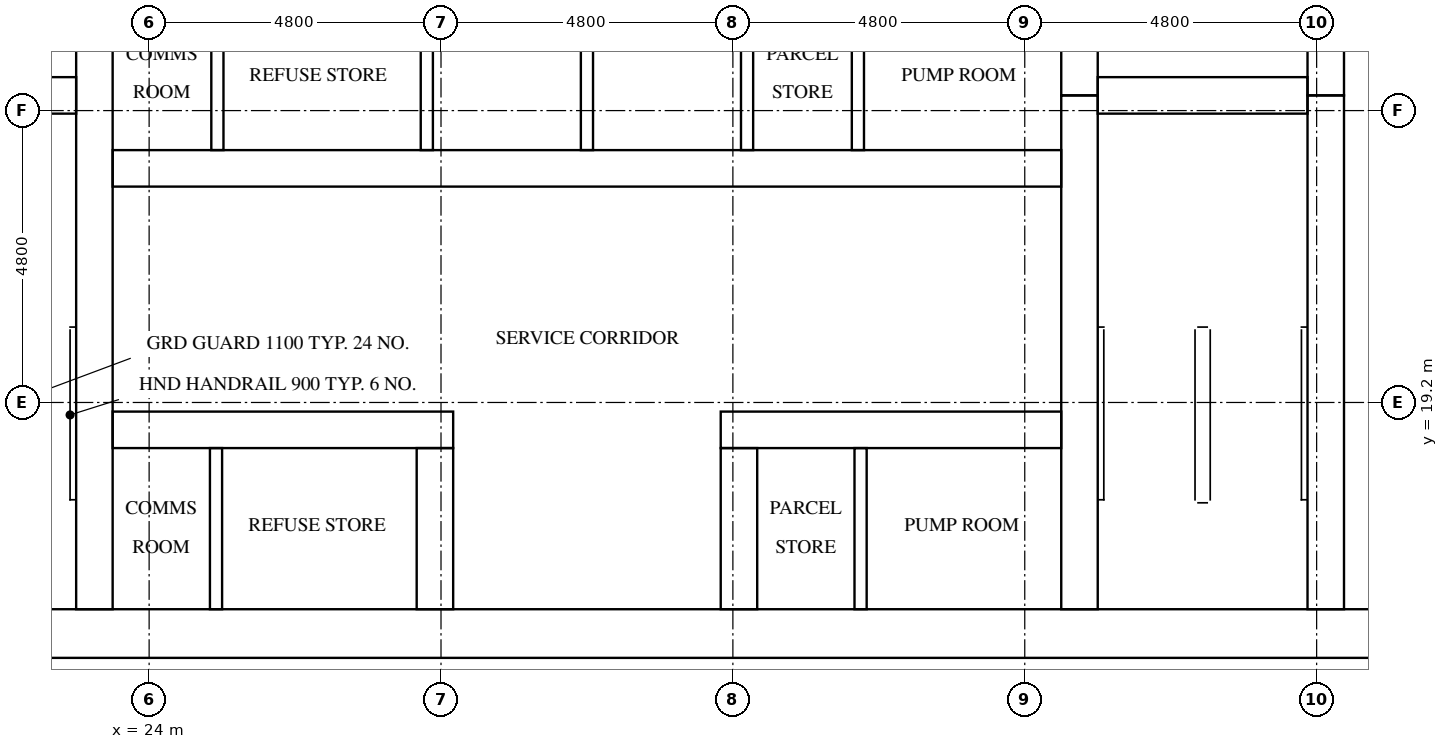
"""IFC4 building model, lengths in metres.
Left out: names, types, materials, properties, quantities, classifications, styles, units other than length and angle.
Written with IfcOpenShell. Run it as: python <this file> out.ifc"""

import sys

from ifc_helpers import new_model, si_unit, direction, frame, frame_2d, origin, place, context, subcontext, project, spatial, rectangle, extrude, element, fill, save


model = new_model("IFC4")
c1 = context("Model", 3, precision=1e-05, world=origin(), true_north=direction((0.0, 1.0)))
c2 = subcontext(c1, "Body", "Model", "MODEL_VIEW")
j1 = project(units=[si_unit("LENGTHUNIT", "METRE"), si_unit("PLANEANGLEUNIT", "RADIAN")], contexts=[c1])
p1 = place(None, origin())
s1 = spatial("IfcSite", under=j1, at=p1, CompositionType="ELEMENT")
p2 = place(p1, origin())
s2 = spatial("IfcBuilding", under=s1, at=p2, CompositionType="ELEMENT")
p3 = place(p2, frame((0.0, 0.0, 166.5)))
s3 = spatial("IfcBuildingStorey", under=s2, at=p3, CompositionType="ELEMENT", Elevation=166.5)
p4 = place(p3, frame((15.0, 15.4, 0.0), z_axis=(0.0, 0.0, 1.0), x_axis=(1.0, 0.0, 0.0)))
e1 = element("IfcWall", 1, at=p4, inside=s3, PredefinedType="SHEAR", context=c2, shape_type="SweptSolid", body=[
    extrude(rectangle(XDim=32.4, YDim=0.8, at=frame_2d((16.2, 0.0))), origin(), (0.0, 0.0, 1.0), 3.2),
])
p5 = place(p4, frame((15.3, 0.0, 0.0)))
e2 = element("IfcOpeningElement", 2, at=p5, cuts=e1, PredefinedType="OPENING", context=c2, shape_type="SweptSolid", body=[
    extrude(rectangle(XDim=1.8, YDim=2.1, at=frame_2d((0.9, 1.05))), frame((0.0, 0.41, 0.0), z_axis=(0.0, -1.0, 0.0), x_axis=(1.0, 0.0, 0.0)), (0.0, 0.0, 1.0), 0.82),
])
p6 = place(p3, frame((23.1, 15.8, 0.0), z_axis=(0.0, 0.0, 1.0), x_axis=(0.0, 1.0, 0.0)))
e3 = element("IfcWall", 3, at=p6, inside=s3, PredefinedType="SHEAR", context=c2, shape_type="SweptSolid", body=[
    extrude(rectangle(XDim=21.2, YDim=0.6, at=frame_2d((10.6, 0.0))), origin(), (0.0, 0.0, 1.0), 3.2),
])
p7 = place(p3, frame((39.3, 15.8, 0.0), z_axis=(0.0, 0.0, 1.0), x_axis=(0.0, 1.0, 0.0)))
e4 = element("IfcWall", 4, at=p7, inside=s3, PredefinedType="SHEAR", context=c2, shape_type="SweptSolid", body=[
    extrude(rectangle(XDim=8.45, YDim=0.6, at=frame_2d((4.225, 0.0))), origin(), (0.0, 0.0, 1.0), 3.2),
])
p8 = place(p3, frame((39.3, 24.25, 0.0), z_axis=(0.0, 0.0, 1.0), x_axis=(0.0, 1.0, 0.0)))
e5 = element("IfcWall", 5, at=p8, inside=s3, PredefinedType="SHEAR", context=c2, shape_type="SweptSolid", body=[
    extrude(rectangle(XDim=3.5, YDim=0.6, at=frame_2d((1.75, 0.0))), origin(), (0.0, 0.0, 1.0), 3.2),
])
p9 = place(p3, frame((43.35, 15.8, 0.0), z_axis=(0.0, 0.0, 1.0), x_axis=(0.0, 1.0, 0.0)))
e6 = element("IfcWall", 6, at=p9, inside=s3, PredefinedType="SHEAR", context=c2, shape_type="SweptSolid", body=[
    extrude(rectangle(XDim=8.45, YDim=0.6, at=frame_2d((4.225, 0.0))), origin(), (0.0, 0.0, 1.0), 3.2),
])
p10 = place(p9, frame((0.4, 0.0, 0.0)))
e7 = element("IfcOpeningElement", 7, at=p10, cuts=e6, PredefinedType="OPENING", context=c2, shape_type="SweptSolid", body=[
    extrude(rectangle(XDim=1.2, YDim=2.1, at=frame_2d((0.6, 1.05))), frame((0.0, 0.31, 0.0), z_axis=(0.0, -1.0, 0.0), x_axis=(1.0, 0.0, 0.0)), (0.0, 0.0, 1.0), 0.62),
])
p11 = place(p3, frame((43.35, 24.25, 0.0), z_axis=(0.0, 0.0, 1.0), x_axis=(0.0, 1.0, 0.0)))
e8 = element("IfcWall", 8, at=p11, inside=s3, PredefinedType="SHEAR", context=c2, shape_type="SweptSolid", body=[
    extrude(rectangle(XDim=3.5, YDim=0.6, at=frame_2d((1.75, 0.0))), origin(), (0.0, 0.0, 1.0), 3.2),
])
p12 = place(p11, frame((1.2, 0.0, 0.0)))
e9 = element("IfcOpeningElement", 9, at=p12, cuts=e8, PredefinedType="OPENING", context=c2, shape_type="SweptSolid", body=[
    extrude(rectangle(XDim=1.1, YDim=2.1, at=frame_2d((0.55, 1.05))), frame((0.0, 0.31, 0.0), z_axis=(0.0, -1.0, 0.0), x_axis=(1.0, 0.0, 0.0)), (0.0, 0.0, 1.0), 0.62),
])
for number, where, z_axis, x_axis in (
    (10, (19.35, 24.25, 0.0), (0.0, 0.0, 1.0), (1.0, 0.0, 0.0)),
    (11, (39.6, 24.25, 0.0), (0.0, 0.0, 1.0), (1.0, 0.0, 0.0)),
):
    element("IfcWall", number, at=place(p3, frame(where, z_axis=z_axis, x_axis=x_axis)), inside=s3, PredefinedType="SHEAR", context=c2, shape_type="SweptSolid", body=[
        extrude(rectangle(XDim=3.45, YDim=0.6, at=frame_2d((1.725, 0.0))), origin(), (0.0, 0.0, 1.0), 3.2),
    ])
p13 = place(p3, frame((23.4, 18.75, 0.0), z_axis=(0.0, 0.0, 1.0), x_axis=(1.0, 0.0, 0.0)))
e12 = element("IfcWall", 12, at=p13, inside=s3, PredefinedType="SHEAR", context=c2, shape_type="SweptSolid", body=[
    extrude(rectangle(XDim=5.6, YDim=0.6, at=frame_2d((2.8, 0.0))), origin(), (0.0, 0.0, 1.0), 3.2),
])
p14 = place(p13, frame((0.3, 0.0, 0.0)))
e13 = element("IfcOpeningElement", 13, at=p14, cuts=e12, PredefinedType="OPENING", context=c2, shape_type="SweptSolid", body=[
    extrude(rectangle(XDim=1.0, YDim=2.1, at=frame_2d((0.5, 1.05))), frame((0.0, 0.31, 0.0), z_axis=(0.0, -1.0, 0.0), x_axis=(1.0, 0.0, 0.0)), (0.0, 0.0, 1.0), 0.62),
])
p15 = place(p13, frame((2.9, 0.0, 0.0)))
e14 = element("IfcOpeningElement", 14, at=p15, cuts=e12, PredefinedType="OPENING", context=c2, shape_type="SweptSolid", body=[
    extrude(rectangle(XDim=1.0, YDim=2.1, at=frame_2d((0.5, 1.05))), frame((0.0, 0.31, 0.0), z_axis=(0.0, -1.0, 0.0), x_axis=(1.0, 0.0, 0.0)), (0.0, 0.0, 1.0), 0.62),
])
p16 = place(p3, frame((33.4, 18.75, 0.0), z_axis=(0.0, 0.0, 1.0), x_axis=(1.0, 0.0, 0.0)))
e15 = element("IfcWall", 15, at=p16, inside=s3, PredefinedType="SHEAR", context=c2, shape_type="SweptSolid", body=[
    extrude(rectangle(XDim=5.6, YDim=0.6, at=frame_2d((2.8, 0.0))), origin(), (0.0, 0.0, 1.0), 3.2),
])
p17 = place(p16, frame((0.9, 0.0, 0.0)))
e16 = element("IfcOpeningElement", 16, at=p17, cuts=e15, PredefinedType="OPENING", context=c2, shape_type="SweptSolid", body=[
    extrude(rectangle(XDim=1.0, YDim=2.1, at=frame_2d((0.5, 1.05))), frame((0.0, 0.31, 0.0), z_axis=(0.0, -1.0, 0.0), x_axis=(1.0, 0.0, 0.0)), (0.0, 0.0, 1.0), 0.62),
])
p18 = place(p16, frame((3.5, 0.0, 0.0)))
e17 = element("IfcOpeningElement", 17, at=p18, cuts=e15, PredefinedType="OPENING", context=c2, shape_type="SweptSolid", body=[
    extrude(rectangle(XDim=1.0, YDim=2.1, at=frame_2d((0.5, 1.05))), frame((0.0, 0.31, 0.0), z_axis=(0.0, -1.0, 0.0), x_axis=(1.0, 0.0, 0.0)), (0.0, 0.0, 1.0), 0.62),
])
p19 = place(p3, frame((23.4, 23.05, 0.0), z_axis=(0.0, 0.0, 1.0), x_axis=(1.0, 0.0, 0.0)))
e18 = element("IfcWall", 18, at=p19, inside=s3, PredefinedType="SHEAR", context=c2, shape_type="SweptSolid", body=[
    extrude(rectangle(XDim=15.6, YDim=0.6, at=frame_2d((7.8, 0.0))), origin(), (0.0, 0.0, 1.0), 3.2),
])
p20 = place(p19, frame((0.311, 0.0, 0.0)))
e19 = element("IfcOpeningElement", 19, at=p20, cuts=e18, PredefinedType="OPENING", context=c2, shape_type="SweptSolid", body=[
    extrude(rectangle(XDim=1.0, YDim=2.1, at=frame_2d((0.5, 1.05))), frame((0.0, 0.31, 0.0), z_axis=(0.0, -1.0, 0.0), x_axis=(1.0, 0.0, 0.0)), (0.0, 0.0, 1.0), 0.62),
])
p21 = place(p19, frame((2.945, 0.0, 0.0)))
e20 = element("IfcOpeningElement", 20, at=p21, cuts=e18, PredefinedType="OPENING", context=c2, shape_type="SweptSolid", body=[
    extrude(rectangle(XDim=1.0, YDim=2.1, at=frame_2d((0.5, 1.05))), frame((0.0, 0.31, 0.0), z_axis=(0.0, -1.0, 0.0), x_axis=(1.0, 0.0, 0.0)), (0.0, 0.0, 1.0), 0.62),
])
p22 = place(p19, frame((10.845, 0.0, 0.0)))
e21 = element("IfcOpeningElement", 21, at=p22, cuts=e18, PredefinedType="OPENING", context=c2, shape_type="SweptSolid", body=[
    extrude(rectangle(XDim=1.0, YDim=2.1, at=frame_2d((0.5, 1.05))), frame((0.0, 0.31, 0.0), z_axis=(0.0, -1.0, 0.0), x_axis=(1.0, 0.0, 0.0)), (0.0, 0.0, 1.0), 0.62),
])
p23 = place(p19, frame((13.478, 0.0, 0.0)))
e22 = element("IfcOpeningElement", 22, at=p23, cuts=e18, PredefinedType="OPENING", context=c2, shape_type="SweptSolid", body=[
    extrude(rectangle(XDim=1.0, YDim=2.1, at=frame_2d((0.5, 1.05))), frame((0.0, 0.31, 0.0), z_axis=(0.0, -1.0, 0.0), x_axis=(1.0, 0.0, 0.0)), (0.0, 0.0, 1.0), 0.62),
])
for number, where, z_axis, x_axis in (
    (23, (28.7, 15.8, 0.0), (0.0, 0.0, 1.0), (0.0, 1.0, 0.0)),
    (24, (33.7, 15.8, 0.0), (0.0, 0.0, 1.0), (0.0, 1.0, 0.0)),
):
    element("IfcWall", number, at=place(p3, frame(where, z_axis=z_axis, x_axis=x_axis)), inside=s3, PredefinedType="SHEAR", context=c2, shape_type="SweptSolid", body=[
        extrude(rectangle(XDim=2.65, YDim=0.6, at=frame_2d((1.325, 0.0))), origin(), (0.0, 0.0, 1.0), 3.2),
    ])
for number, where, z_axis, x_axis in (
    (25, (28.567, 23.35, 0.0), (0.0, 0.0, 1.0), (0.0, 1.0, 0.0)),
    (26, (31.2, 23.35, 0.0), (0.0, 0.0, 1.0), (0.0, 1.0, 0.0)),
    (27, (33.833, 23.35, 0.0), (0.0, 0.0, 1.0), (0.0, 1.0, 0.0)),
):
    element("IfcWall", number, at=place(p3, frame(where, z_axis=z_axis, x_axis=x_axis)), inside=s3, PredefinedType="SOLIDWALL", context=c2, shape_type="SweptSolid", body=[
        extrude(rectangle(XDim=2.5, YDim=0.2, at=frame_2d((1.25, 0.0))), origin(), (0.0, 0.0, 1.0), 3.2),
    ])
for number, where, z_axis, x_axis in (
    (28, (25.123, 23.35, 0.0), (0.0, 0.0, 1.0), (0.0, 1.0, 0.0)),
    (29, (35.656, 23.35, 0.0), (0.0, 0.0, 1.0), (0.0, 1.0, 0.0)),
):
    element("IfcWall", number, at=place(p3, frame(where, z_axis=z_axis, x_axis=x_axis)), inside=s3, PredefinedType="PARTITIONING", context=c2, shape_type="SweptSolid", body=[
        extrude(rectangle(XDim=2.5, YDim=0.2, at=frame_2d((1.25, 0.0))), origin(), (0.0, 0.0, 1.0), 3.2),
    ])
for number, where, z_axis, x_axis in (
    (30, (25.1, 15.8, 0.0), (0.0, 0.0, 1.0), (0.0, 1.0, 0.0)),
    (31, (35.7, 15.8, 0.0), (0.0, 0.0, 1.0), (0.0, 1.0, 0.0)),
):
    element("IfcWall", number, at=place(p3, frame(where, z_axis=z_axis, x_axis=x_axis)), inside=s3, PredefinedType="PARTITIONING", context=c2, shape_type="SweptSolid", body=[
        extrude(rectangle(XDim=2.65, YDim=0.2, at=frame_2d((1.325, 0.0))), origin(), (0.0, 0.0, 1.0), 3.2),
    ])
p24 = place(p10, origin())
e32 = element("IfcDoor", 32, at=p24, inside=s3, OperationType="SINGLE_SWING_RIGHT", PredefinedType="DOOR", context=c2, shape_type="SweptSolid", body=[
    extrude(rectangle(XDim=1.2, YDim=2.1, at=frame_2d((0.6, 1.05))), frame((0.0, 0.025, 0.0), z_axis=(0.0, -1.0, 0.0), x_axis=(1.0, 0.0, 0.0)), (0.0, 0.0, 1.0), 0.05),
])
fill(e7, e32)
p25 = place(p5, frame((1.8, 0.0, 0.0), z_axis=(0.0, 0.0, 1.0), x_axis=(-1.0, 0.0, 0.0)))
e33 = element("IfcDoor", 33, at=p25, inside=s3, OperationType="DOUBLE_DOOR_SINGLE_SWING", PredefinedType="DOOR", context=c2, shape_type="SweptSolid", body=[
    extrude(rectangle(XDim=1.8, YDim=2.1, at=frame_2d((0.9, 1.05))), frame((0.0, 0.025, 0.0), z_axis=(0.0, -1.0, 0.0), x_axis=(1.0, 0.0, 0.0)), (0.0, 0.0, 1.0), 0.05),
])
fill(e2, e33)
p26 = place(p20, frame((1.0, 0.0, 0.0), z_axis=(0.0, 0.0, 1.0), x_axis=(-1.0, 0.0, 0.0)))
e34 = element("IfcDoor", 34, at=p26, inside=s3, OperationType="SINGLE_SWING_RIGHT", PredefinedType="DOOR", context=c2, shape_type="SweptSolid", body=[
    extrude(rectangle(XDim=1.0, YDim=2.1, at=frame_2d((0.5, 1.05))), frame((0.0, 0.025, 0.0), z_axis=(0.0, -1.0, 0.0), x_axis=(1.0, 0.0, 0.0)), (0.0, 0.0, 1.0), 0.05),
])
fill(e19, e34)
p27 = place(p21, frame((1.0, 0.0, 0.0), z_axis=(0.0, 0.0, 1.0), x_axis=(-1.0, 0.0, 0.0)))
e35 = element("IfcDoor", 35, at=p27, inside=s3, OperationType="SINGLE_SWING_LEFT", PredefinedType="DOOR", context=c2, shape_type="SweptSolid", body=[
    extrude(rectangle(XDim=1.0, YDim=2.1, at=frame_2d((0.5, 1.05))), frame((0.0, 0.025, 0.0), z_axis=(0.0, -1.0, 0.0), x_axis=(1.0, 0.0, 0.0)), (0.0, 0.0, 1.0), 0.05),
])
fill(e20, e35)
p28 = place(p22, frame((1.0, 0.0, 0.0), z_axis=(0.0, 0.0, 1.0), x_axis=(-1.0, 0.0, 0.0)))
e36 = element("IfcDoor", 36, at=p28, inside=s3, OperationType="SINGLE_SWING_RIGHT", PredefinedType="DOOR", context=c2, shape_type="SweptSolid", body=[
    extrude(rectangle(XDim=1.0, YDim=2.1, at=frame_2d((0.5, 1.05))), frame((0.0, 0.025, 0.0), z_axis=(0.0, -1.0, 0.0), x_axis=(1.0, 0.0, 0.0)), (0.0, 0.0, 1.0), 0.05),
])
fill(e21, e36)
p29 = place(p23, frame((1.0, 0.0, 0.0), z_axis=(0.0, 0.0, 1.0), x_axis=(-1.0, 0.0, 0.0)))
e37 = element("IfcDoor", 37, at=p29, inside=s3, OperationType="SINGLE_SWING_LEFT", PredefinedType="DOOR", context=c2, shape_type="SweptSolid", body=[
    extrude(rectangle(XDim=1.0, YDim=2.1, at=frame_2d((0.5, 1.05))), frame((0.0, 0.025, 0.0), z_axis=(0.0, -1.0, 0.0), x_axis=(1.0, 0.0, 0.0)), (0.0, 0.0, 1.0), 0.05),
])
fill(e22, e37)
p30 = place(p14, origin())
e38 = element("IfcDoor", 38, at=p30, inside=s3, OperationType="SINGLE_SWING_RIGHT", PredefinedType="DOOR", context=c2, shape_type="SweptSolid", body=[
    extrude(rectangle(XDim=1.0, YDim=2.1, at=frame_2d((0.5, 1.05))), frame((0.0, 0.025, 0.0), z_axis=(0.0, -1.0, 0.0), x_axis=(1.0, 0.0, 0.0)), (0.0, 0.0, 1.0), 0.05),
])
fill(e13, e38)
p31 = place(p15, origin())
e39 = element("IfcDoor", 39, at=p31, inside=s3, OperationType="SINGLE_SWING_LEFT", PredefinedType="DOOR", context=c2, shape_type="SweptSolid", body=[
    extrude(rectangle(XDim=1.0, YDim=2.1, at=frame_2d((0.5, 1.05))), frame((0.0, 0.025, 0.0), z_axis=(0.0, -1.0, 0.0), x_axis=(1.0, 0.0, 0.0)), (0.0, 0.0, 1.0), 0.05),
])
fill(e14, e39)
p32 = place(p17, origin())
e40 = element("IfcDoor", 40, at=p32, inside=s3, OperationType="SINGLE_SWING_RIGHT", PredefinedType="DOOR", context=c2, shape_type="SweptSolid", body=[
    extrude(rectangle(XDim=1.0, YDim=2.1, at=frame_2d((0.5, 1.05))), frame((0.0, 0.025, 0.0), z_axis=(0.0, -1.0, 0.0), x_axis=(1.0, 0.0, 0.0)), (0.0, 0.0, 1.0), 0.05),
])
fill(e16, e40)
p33 = place(p18, origin())
e41 = element("IfcDoor", 41, at=p33, inside=s3, OperationType="SINGLE_SWING_LEFT", PredefinedType="DOOR", context=c2, shape_type="SweptSolid", body=[
    extrude(rectangle(XDim=1.0, YDim=2.1, at=frame_2d((0.5, 1.05))), frame((0.0, 0.025, 0.0), z_axis=(0.0, -1.0, 0.0), x_axis=(1.0, 0.0, 0.0)), (0.0, 0.0, 1.0), 0.05),
])
fill(e17, e41)
save(model, sys.argv[1])
